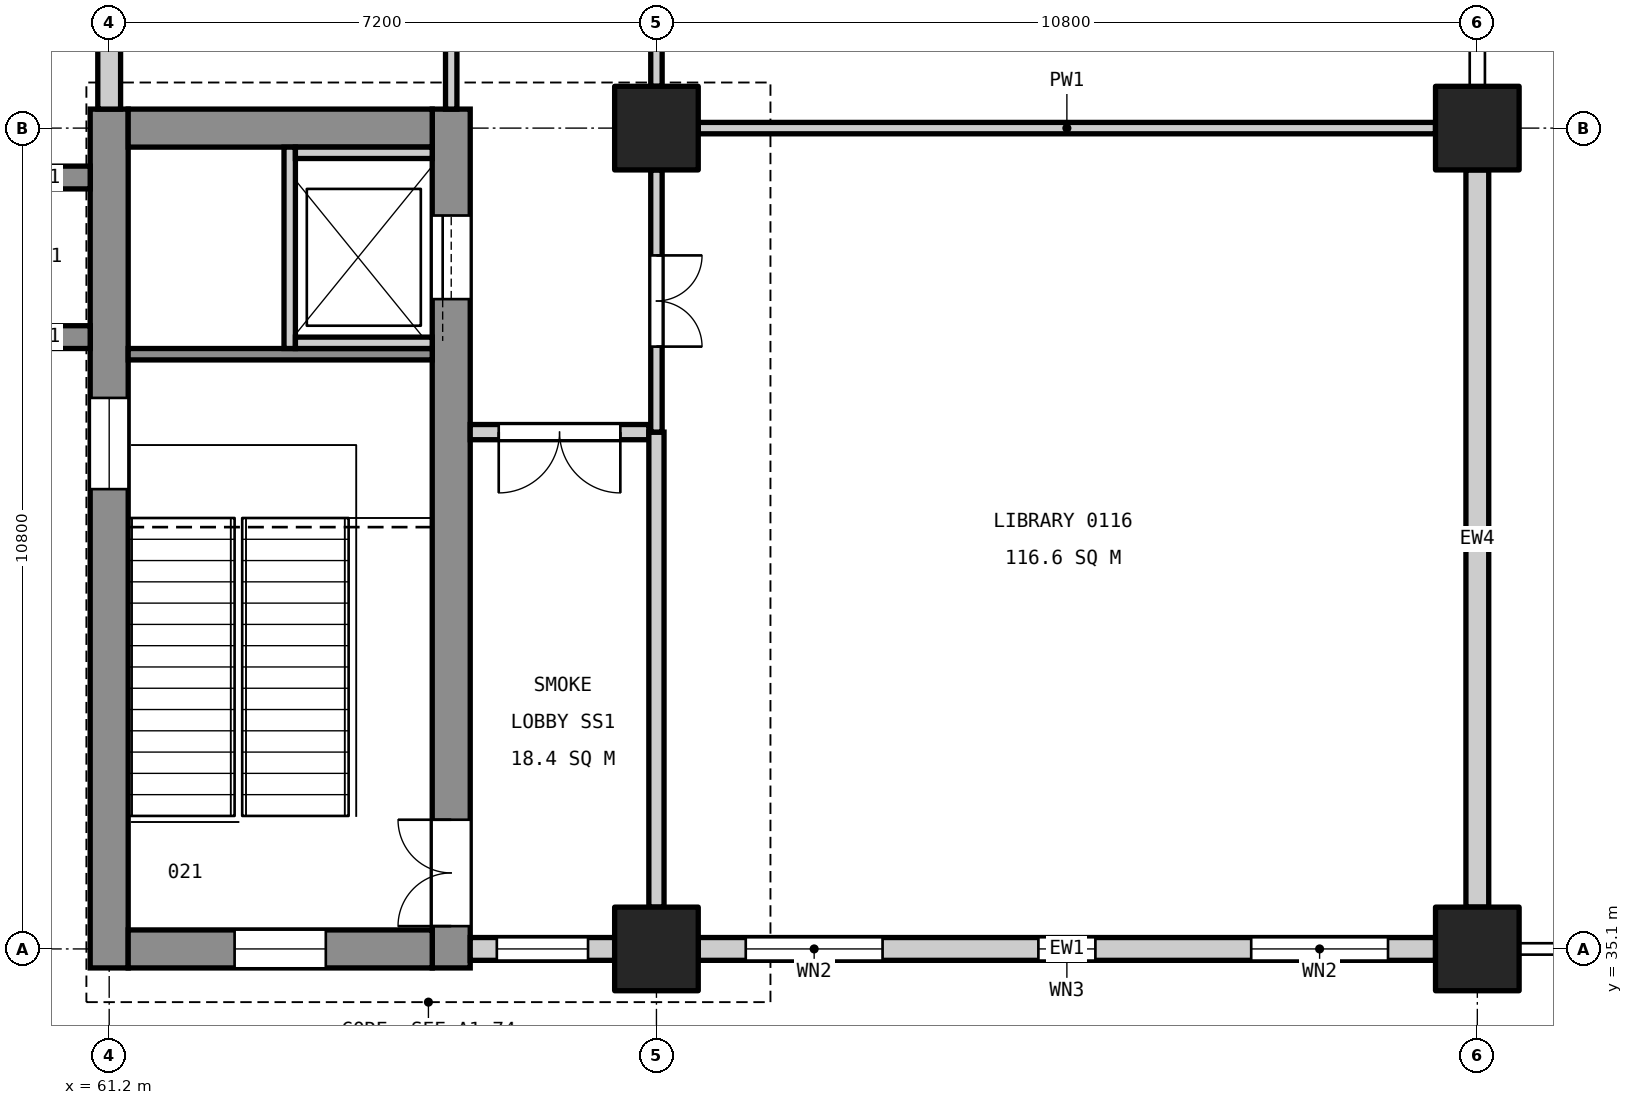
"""IFC4 building model, lengths in metres.
Left out: names, types, materials, properties, quantities, classifications, styles, units other than length and angle.
Written with IfcOpenShell. Run it as: python <this file> out.ifc"""

import sys

from ifc_helpers import new_model, si_unit, direction, frame, frame_2d, origin, origin_2d, place, context, subcontext, project, spatial, rectangle, extrude, element, fill, save


model = new_model("IFC4")
c1 = context("Model", 3, precision=1e-05, world=origin(), true_north=direction((0.0, 1.0)))
c2 = subcontext(c1, "Body", "Model", "MODEL_VIEW")
j1 = project(units=[si_unit("LENGTHUNIT", "METRE"), si_unit("PLANEANGLEUNIT", "RADIAN")], contexts=[c1])
p1 = place(None, origin())
s1 = spatial("IfcSite", under=j1, at=p1, CompositionType="ELEMENT")
p2 = place(p1, origin())
s2 = spatial("IfcBuilding", under=s1, at=p2, CompositionType="ELEMENT")
p3 = place(p2, frame((0.0, 0.0, 6.0)))
s3 = spatial("IfcBuildingStorey", under=s2, at=p3, CompositionType="ELEMENT", Elevation=6.0)
for number, where, z_axis, x_axis in (
    (1, (68.4, 35.1, 0.0), (0.0, 0.0, 1.0), (1.0, 0.0, 0.0)),
    (2, (68.4, 45.9, 0.0), (0.0, 0.0, 1.0), (1.0, 0.0, 0.0)),
    (3, (79.2, 35.1, 0.0), (0.0, 0.0, 1.0), (1.0, 0.0, 0.0)),
    (4, (79.2, 45.9, 0.0), (0.0, 0.0, 1.0), (1.0, 0.0, 0.0)),
):
    element("IfcColumn", number, at=place(p3, frame(where, z_axis=z_axis, x_axis=x_axis)), inside=s3, PredefinedType="COLUMN", context=c2, shape_type="SweptSolid", body=[
        extrude(rectangle(XDim=1.1, YDim=1.1, at=origin_2d()), origin(), (0.0, 0.0, 1.0), 5.4),
    ])
p4 = place(p3, frame((61.2, 34.85, 0.0), z_axis=(0.0, 0.0, 1.0), x_axis=(0.0, 1.0, 0.0)))
e5 = element("IfcWall", 5, at=p4, inside=s3, PredefinedType="SHEAR", context=c2, shape_type="SweptSolid", body=[
    extrude(rectangle(XDim=11.3, YDim=0.5, at=frame_2d((5.65, 0.0))), origin(), (0.0, 0.0, 1.0), 5.1),
])
p5 = place(p4, frame((6.3, 0.0, 3.4)))
e6 = element("IfcOpeningElement", 6, at=p5, cuts=e5, PredefinedType="OPENING", context=c2, shape_type="SweptSolid", body=[
    extrude(rectangle(XDim=1.2, YDim=0.9, at=frame_2d((0.6, 0.45))), frame((0.0, 0.26, 0.0), z_axis=(0.0, -1.0, 0.0), x_axis=(1.0, 0.0, 0.0)), (0.0, 0.0, 1.0), 0.52),
])
p6 = place(p3, frame((65.7, 34.85, 0.0), z_axis=(0.0, 0.0, 1.0), x_axis=(0.0, 1.0, 0.0)))
e7 = element("IfcWall", 7, at=p6, inside=s3, PredefinedType="SHEAR", context=c2, shape_type="SweptSolid", body=[
    extrude(rectangle(XDim=11.3, YDim=0.5, at=frame_2d((5.65, 0.0))), origin(), (0.0, 0.0, 1.0), 5.1),
])
p7 = place(p6, frame((0.55, 0.0, 0.0)))
e8 = element("IfcOpeningElement", 8, at=p7, cuts=e7, PredefinedType="OPENING", context=c2, shape_type="SweptSolid", body=[
    extrude(rectangle(XDim=1.4, YDim=2.1, at=frame_2d((0.7, 1.05))), frame((0.0, 0.26, 0.0), z_axis=(0.0, -1.0, 0.0), x_axis=(1.0, 0.0, 0.0)), (0.0, 0.0, 1.0), 0.52),
])
p8 = place(p6, frame((8.8, 0.0, 0.0)))
e9 = element("IfcOpeningElement", 9, at=p8, cuts=e7, PredefinedType="OPENING", context=c2, shape_type="SweptSolid", body=[
    extrude(rectangle(XDim=1.1, YDim=2.1, at=frame_2d((0.55, 1.05))), frame((0.0, 0.26, 0.0), z_axis=(0.0, -1.0, 0.0), x_axis=(1.0, 0.0, 0.0)), (0.0, 0.0, 1.0), 0.52),
])
p9 = place(p3, frame((61.45, 35.1, 0.0), z_axis=(0.0, 0.0, 1.0), x_axis=(1.0, 0.0, 0.0)))
e10 = element("IfcWall", 10, at=p9, inside=s3, PredefinedType="SHEAR", context=c2, shape_type="SweptSolid", body=[
    extrude(rectangle(XDim=4.0, YDim=0.5, at=frame_2d((2.0, 0.0))), origin(), (0.0, 0.0, 1.0), 5.1),
])
p10 = place(p9, frame((1.4, 0.0, 3.4)))
e11 = element("IfcOpeningElement", 11, at=p10, cuts=e10, PredefinedType="OPENING", context=c2, shape_type="SweptSolid", body=[
    extrude(rectangle(XDim=1.2, YDim=0.9, at=frame_2d((0.6, 0.45))), frame((0.0, 0.26, 0.0), z_axis=(0.0, -1.0, 0.0), x_axis=(1.0, 0.0, 0.0)), (0.0, 0.0, 1.0), 0.52),
])
p11 = place(p3, frame((61.45, 45.9, 0.0), z_axis=(0.0, 0.0, 1.0), x_axis=(1.0, 0.0, 0.0)))
e12 = element("IfcWall", 12, at=p11, inside=s3, PredefinedType="SHEAR", context=c2, shape_type="SweptSolid", body=[
    extrude(rectangle(XDim=4.0, YDim=0.5, at=frame_2d((2.0, 0.0))), origin(), (0.0, 0.0, 1.0), 5.1),
])
for number, where, z_axis, x_axis in (
    (13, (60.95, 43.15, 0.0), (0.0, 0.0, 1.0), (-1.0, 0.0, 0.0)),
    (14, (60.95, 45.25, 0.0), (0.0, 0.0, 1.0), (-1.0, 0.0, 0.0)),
):
    element("IfcWall", number, at=place(p3, frame(where, z_axis=z_axis, x_axis=x_axis)), inside=s3, PredefinedType="SHEAR", context=c2, shape_type="SweptSolid", body=[
        extrude(rectangle(XDim=1.25, YDim=0.3, at=frame_2d((0.625, 0.0))), origin(), (0.0, 0.0, 1.0), 5.4),
    ])
p12 = place(p3, frame((61.45, 42.925, 0.0), z_axis=(0.0, 0.0, 1.0), x_axis=(1.0, 0.0, 0.0)))
e15 = element("IfcWall", 15, at=p12, inside=s3, PredefinedType="SOLIDWALL", context=c2, shape_type="SweptSolid", body=[
    extrude(rectangle(XDim=4.0, YDim=0.15, at=frame_2d((2.0, 0.0))), origin(), (0.0, 0.0, 1.0), 5.1),
])
p13 = place(p3, frame((63.575, 43.0, 0.0), z_axis=(0.0, 0.0, 1.0), x_axis=(0.0, 1.0, 0.0)))
e16 = element("IfcWall", 16, at=p13, inside=s3, PredefinedType="SOLIDWALL", context=c2, shape_type="SweptSolid", body=[
    extrude(rectangle(XDim=2.65, YDim=0.15, at=frame_2d((1.325, 0.0))), origin(), (0.0, 0.0, 1.0), 5.4),
])
for number, where, z_axis, x_axis in (
    (17, (63.65, 43.075, 0.0), (0.0, 0.0, 1.0), (1.0, 0.0, 0.0)),
    (18, (63.65, 45.575, 0.0), (0.0, 0.0, 1.0), (1.0, 0.0, 0.0)),
):
    element("IfcWall", number, at=place(p3, frame(where, z_axis=z_axis, x_axis=x_axis)), inside=s3, PredefinedType="SOLIDWALL", context=c2, shape_type="SweptSolid", body=[
        extrude(rectangle(XDim=1.8, YDim=0.15, at=frame_2d((0.9, 0.0))), origin(), (0.0, 0.0, 1.0), 5.4),
    ])
p14 = place(p3, frame((61.2, 46.15, 0.0), z_axis=(0.0, 0.0, 1.0), x_axis=(0.0, 1.0, 0.0)))
e19 = element("IfcWall", 19, at=p14, inside=s3, PredefinedType="STANDARD", context=c2, shape_type="SweptSolid", body=[
    extrude(rectangle(XDim=10.0, YDim=0.3, at=frame_2d((5.0, 0.0))), origin(), (0.0, 0.0, 1.0), 4.1),
])
p15 = place(p14, frame((1.3, 0.0, 0.8)))
e20 = element("IfcOpeningElement", 20, at=p15, cuts=e19, PredefinedType="OPENING", context=c2, shape_type="SweptSolid", body=[
    extrude(rectangle(XDim=0.75, YDim=1.2, at=frame_2d((0.375, 0.6))), frame((0.0, 0.16, 0.0), z_axis=(0.0, -1.0, 0.0), x_axis=(1.0, 0.0, 0.0)), (0.0, 0.0, 1.0), 0.32),
])
p16 = place(p14, frame((4.25, 0.0, 0.9)))
e21 = element("IfcOpeningElement", 21, at=p16, cuts=e19, PredefinedType="OPENING", context=c2, shape_type="SweptSolid", body=[
    extrude(rectangle(XDim=1.8, YDim=3.0, at=frame_2d((0.9, 1.5))), frame((0.0, 0.16, 0.0), z_axis=(0.0, -1.0, 0.0), x_axis=(1.0, 0.0, 0.0)), (0.0, 0.0, 1.0), 0.32),
])
p17 = place(p14, frame((7.575, 0.0, 0.9)))
e22 = element("IfcOpeningElement", 22, at=p17, cuts=e19, PredefinedType="OPENING", context=c2, shape_type="SweptSolid", body=[
    extrude(rectangle(XDim=1.8, YDim=3.0, at=frame_2d((0.9, 1.5))), frame((0.0, 0.16, 0.0), z_axis=(0.0, -1.0, 0.0), x_axis=(1.0, 0.0, 0.0)), (0.0, 0.0, 1.0), 0.32),
])
p18 = place(p3, frame((65.95, 35.1, 0.0), z_axis=(0.0, 0.0, 1.0), x_axis=(1.0, 0.0, 0.0)))
e23 = element("IfcWall", 23, at=p18, inside=s3, PredefinedType="STANDARD", context=c2, shape_type="SweptSolid", body=[
    extrude(rectangle(XDim=1.9, YDim=0.3, at=frame_2d((0.95, 0.0))), origin(), (0.0, 0.0, 1.0), 4.3),
])
p19 = place(p18, frame((0.35, 0.0, 0.9)))
e24 = element("IfcOpeningElement", 24, at=p19, cuts=e23, PredefinedType="OPENING", context=c2, shape_type="SweptSolid", body=[
    extrude(rectangle(XDim=1.2, YDim=2.4, at=frame_2d((0.6, 1.2))), frame((0.0, 0.16, 0.0), z_axis=(0.0, -1.0, 0.0), x_axis=(1.0, 0.0, 0.0)), (0.0, 0.0, 1.0), 0.32),
])
p20 = place(p3, frame((68.95, 35.1, 0.0), z_axis=(0.0, 0.0, 1.0), x_axis=(1.0, 0.0, 0.0)))
e25 = element("IfcWall", 25, at=p20, inside=s3, PredefinedType="STANDARD", context=c2, shape_type="SweptSolid", body=[
    extrude(rectangle(XDim=9.7, YDim=0.3, at=frame_2d((4.85, 0.0))), origin(), (0.0, 0.0, 1.0), 4.3),
])
p21 = place(p20, frame((0.625, 0.0, 0.9)))
e26 = element("IfcOpeningElement", 26, at=p21, cuts=e25, PredefinedType="OPENING", context=c2, shape_type="SweptSolid", body=[
    extrude(rectangle(XDim=1.8, YDim=3.0, at=frame_2d((0.9, 1.5))), frame((0.0, 0.16, 0.0), z_axis=(0.0, -1.0, 0.0), x_axis=(1.0, 0.0, 0.0)), (0.0, 0.0, 1.0), 0.32),
])
p22 = place(p20, frame((4.475, 0.0, 0.8)))
e27 = element("IfcOpeningElement", 27, at=p22, cuts=e25, PredefinedType="OPENING", context=c2, shape_type="SweptSolid", body=[
    extrude(rectangle(XDim=0.75, YDim=1.2, at=frame_2d((0.375, 0.6))), frame((0.0, 0.16, 0.0), z_axis=(0.0, -1.0, 0.0), x_axis=(1.0, 0.0, 0.0)), (0.0, 0.0, 1.0), 0.32),
])
p23 = place(p20, frame((7.275, 0.0, 0.9)))
e28 = element("IfcOpeningElement", 28, at=p23, cuts=e25, PredefinedType="OPENING", context=c2, shape_type="SweptSolid", body=[
    extrude(rectangle(XDim=1.8, YDim=3.0, at=frame_2d((0.9, 1.5))), frame((0.0, 0.16, 0.0), z_axis=(0.0, -1.0, 0.0), x_axis=(1.0, 0.0, 0.0)), (0.0, 0.0, 1.0), 0.32),
])
p24 = place(p3, frame((79.2, 35.65, 0.0), z_axis=(0.0, 0.0, 1.0), x_axis=(0.0, 1.0, 0.0)))
e29 = element("IfcWall", 29, at=p24, inside=s3, PredefinedType="STANDARD", context=c2, shape_type="SweptSolid", body=[
    extrude(rectangle(XDim=9.7, YDim=0.3, at=frame_2d((4.85, 0.0))), origin(), (0.0, 0.0, 1.0), 4.0),
])
p25 = place(p3, frame((65.7, 46.15, 0.0), z_axis=(0.0, 0.0, 1.0), x_axis=(0.0, 1.0, 0.0)))
e30 = element("IfcWall", 30, at=p25, inside=s3, PredefinedType="PARTITIONING", context=c2, shape_type="SweptSolid", body=[
    extrude(rectangle(XDim=10.4, YDim=0.15, at=frame_2d((5.2, 0.0))), origin(), (0.0, 0.0, 1.0), 4.0),
])
p26 = place(p25, frame((4.65, 0.0, 0.0)))
e31 = element("IfcOpeningElement", 31, at=p26, cuts=e30, PredefinedType="OPENING", context=c2, shape_type="SweptSolid", body=[
    extrude(rectangle(XDim=1.0, YDim=2.1, at=frame_2d((0.5, 1.05))), frame((0.0, 0.085, 0.0), z_axis=(0.0, -1.0, 0.0), x_axis=(1.0, 0.0, 0.0)), (0.0, 0.0, 1.0), 0.17),
])
p27 = place(p25, frame((1.05, 0.0, 0.0)))
e32 = element("IfcOpeningElement", 32, at=p27, cuts=e30, PredefinedType="OPENING", context=c2, shape_type="SweptSolid", body=[
    extrude(rectangle(XDim=1.0, YDim=2.1, at=frame_2d((0.5, 1.05))), frame((0.0, 0.085, 0.0), z_axis=(0.0, -1.0, 0.0), x_axis=(1.0, 0.0, 0.0)), (0.0, 0.0, 1.0), 0.17),
])
p28 = place(p25, frame((8.25, 0.0, 0.0)))
e33 = element("IfcOpeningElement", 33, at=p28, cuts=e30, PredefinedType="OPENING", context=c2, shape_type="SweptSolid", body=[
    extrude(rectangle(XDim=1.0, YDim=2.1, at=frame_2d((0.5, 1.05))), frame((0.0, 0.085, 0.0), z_axis=(0.0, -1.0, 0.0), x_axis=(1.0, 0.0, 0.0)), (0.0, 0.0, 1.0), 0.17),
])
p29 = place(p3, frame((65.95, 41.9, 0.0), z_axis=(0.0, 0.0, 1.0), x_axis=(1.0, 0.0, 0.0)))
e34 = element("IfcWall", 34, at=p29, inside=s3, PredefinedType="PARTITIONING", context=c2, shape_type="SweptSolid", body=[
    extrude(rectangle(XDim=2.35, YDim=0.2, at=frame_2d((1.175, 0.0))), origin(), (0.0, 0.0, 1.0), 4.0),
])
p30 = place(p29, frame((0.375, 0.0, 0.0)))
e35 = element("IfcOpeningElement", 35, at=p30, cuts=e34, PredefinedType="OPENING", context=c2, shape_type="SweptSolid", body=[
    extrude(rectangle(XDim=1.6, YDim=2.1, at=frame_2d((0.8, 1.05))), frame((0.0, 0.11, 0.0), z_axis=(0.0, -1.0, 0.0), x_axis=(1.0, 0.0, 0.0)), (0.0, 0.0, 1.0), 0.22),
])
p31 = place(p3, frame((68.4, 35.65, 0.0), z_axis=(0.0, 0.0, 1.0), x_axis=(0.0, 1.0, 0.0)))
e36 = element("IfcWall", 36, at=p31, inside=s3, PredefinedType="PARTITIONING", context=c2, shape_type="SweptSolid", body=[
    extrude(rectangle(XDim=6.25, YDim=0.2, at=frame_2d((3.125, 0.0))), origin(), (0.0, 0.0, 1.0), 4.0),
])
p32 = place(p3, frame((68.4, 41.9, 0.0), z_axis=(0.0, 0.0, 1.0), x_axis=(0.0, 1.0, 0.0)))
e37 = element("IfcWall", 37, at=p32, inside=s3, PredefinedType="PARTITIONING", context=c2, shape_type="SweptSolid", body=[
    extrude(rectangle(XDim=3.45, YDim=0.15, at=frame_2d((1.725, 0.0))), origin(), (0.0, 0.0, 1.0), 4.0),
])
p33 = place(p32, frame((1.125, 0.0, 0.0)))
e38 = element("IfcOpeningElement", 38, at=p33, cuts=e37, PredefinedType="OPENING", context=c2, shape_type="SweptSolid", body=[
    extrude(rectangle(XDim=1.2, YDim=2.1, at=frame_2d((0.6, 1.05))), frame((0.0, 0.085, 0.0), z_axis=(0.0, -1.0, 0.0), x_axis=(1.0, 0.0, 0.0)), (0.0, 0.0, 1.0), 0.17),
])
p34 = place(p3, frame((68.4, 46.45, 0.0), z_axis=(0.0, 0.0, 1.0), x_axis=(0.0, 1.0, 0.0)))
e39 = element("IfcWall", 39, at=p34, inside=s3, PredefinedType="PARTITIONING", context=c2, shape_type="SweptSolid", body=[
    extrude(rectangle(XDim=9.7, YDim=0.15, at=frame_2d((4.85, 0.0))), origin(), (0.0, 0.0, 1.0), 4.0),
])
p35 = place(p34, frame((4.25, 0.0, 0.0)))
e40 = element("IfcOpeningElement", 40, at=p35, cuts=e39, PredefinedType="OPENING", context=c2, shape_type="SweptSolid", body=[
    extrude(rectangle(XDim=1.2, YDim=2.1, at=frame_2d((0.6, 1.05))), frame((0.0, 0.085, 0.0), z_axis=(0.0, -1.0, 0.0), x_axis=(1.0, 0.0, 0.0)), (0.0, 0.0, 1.0), 0.17),
])
p36 = place(p3, frame((68.95, 45.9, 0.0), z_axis=(0.0, 0.0, 1.0), x_axis=(1.0, 0.0, 0.0)))
e41 = element("IfcWall", 41, at=p36, inside=s3, PredefinedType="PARTITIONING", context=c2, shape_type="SweptSolid", body=[
    extrude(rectangle(XDim=9.7, YDim=0.15, at=frame_2d((4.85, 0.0))), origin(), (0.0, 0.0, 1.0), 4.3),
])
p37 = place(p7, origin())
e42 = element("IfcDoor", 42, at=p37, inside=s3, OperationType="DOUBLE_DOOR_SINGLE_SWING", PredefinedType="DOOR", context=c2, shape_type="SweptSolid", body=[
    extrude(rectangle(XDim=1.4, YDim=2.1, at=frame_2d((0.7, 1.05))), frame((0.0, 0.025, 0.0), z_axis=(0.0, -1.0, 0.0), x_axis=(1.0, 0.0, 0.0)), (0.0, 0.0, 1.0), 0.05),
])
fill(e8, e42)
p38 = place(p8, origin())
e43 = element("IfcDoor", 43, at=p38, inside=s3, OperationType="SLIDING_TO_LEFT", PredefinedType="DOOR", context=c2, shape_type="SweptSolid", body=[
    extrude(rectangle(XDim=1.1, YDim=2.1, at=frame_2d((0.55, 1.05))), frame((0.0, 0.025, 0.0), z_axis=(0.0, -1.0, 0.0), x_axis=(1.0, 0.0, 0.0)), (0.0, 0.0, 1.0), 0.05),
])
fill(e9, e43)
p39 = place(p19, origin())
e44 = element("IfcWindow", 44, at=p39, inside=s3, PartitioningType="SINGLE_PANEL", PredefinedType="WINDOW", context=c2, shape_type="SweptSolid", body=[
    extrude(rectangle(XDim=1.2, YDim=2.4, at=frame_2d((0.6, 1.2))), frame((0.0, 0.03, 0.0), z_axis=(0.0, -1.0, 0.0), x_axis=(1.0, 0.0, 0.0)), (0.0, 0.0, 1.0), 0.06),
])
fill(e24, e44)
p40 = place(p21, origin())
e45 = element("IfcWindow", 45, at=p40, inside=s3, PartitioningType="SINGLE_PANEL", PredefinedType="WINDOW", context=c2, shape_type="SweptSolid", body=[
    extrude(rectangle(XDim=1.8, YDim=3.0, at=frame_2d((0.9, 1.5))), frame((0.0, 0.03, 0.0), z_axis=(0.0, -1.0, 0.0), x_axis=(1.0, 0.0, 0.0)), (0.0, 0.0, 1.0), 0.06),
])
fill(e26, e45)
p41 = place(p22, origin())
e46 = element("IfcWindow", 46, at=p41, inside=s3, PartitioningType="SINGLE_PANEL", PredefinedType="WINDOW", context=c2, shape_type="SweptSolid", body=[
    extrude(rectangle(XDim=0.75, YDim=1.2, at=frame_2d((0.375, 0.6))), frame((0.0, 0.03, 0.0), z_axis=(0.0, -1.0, 0.0), x_axis=(1.0, 0.0, 0.0)), (0.0, 0.0, 1.0), 0.06),
])
fill(e27, e46)
p42 = place(p23, origin())
e47 = element("IfcWindow", 47, at=p42, inside=s3, PartitioningType="SINGLE_PANEL", PredefinedType="WINDOW", context=c2, shape_type="SweptSolid", body=[
    extrude(rectangle(XDim=1.8, YDim=3.0, at=frame_2d((0.9, 1.5))), frame((0.0, 0.03, 0.0), z_axis=(0.0, -1.0, 0.0), x_axis=(1.0, 0.0, 0.0)), (0.0, 0.0, 1.0), 0.06),
])
fill(e28, e47)
p43 = place(p5, origin())
e48 = element("IfcWindow", 48, at=p43, inside=s3, PartitioningType="SINGLE_PANEL", PredefinedType="WINDOW", context=c2, shape_type="SweptSolid", body=[
    extrude(rectangle(XDim=1.2, YDim=0.9, at=frame_2d((0.6, 0.45))), frame((0.0, 0.03, 0.0), z_axis=(0.0, -1.0, 0.0), x_axis=(1.0, 0.0, 0.0)), (0.0, 0.0, 1.0), 0.06),
])
fill(e6, e48)
p44 = place(p10, origin())
e49 = element("IfcWindow", 49, at=p44, inside=s3, PartitioningType="SINGLE_PANEL", PredefinedType="WINDOW", context=c2, shape_type="SweptSolid", body=[
    extrude(rectangle(XDim=1.2, YDim=0.9, at=frame_2d((0.6, 0.45))), frame((0.0, 0.03, 0.0), z_axis=(0.0, -1.0, 0.0), x_axis=(1.0, 0.0, 0.0)), (0.0, 0.0, 1.0), 0.06),
])
fill(e11, e49)
p45 = place(p33, frame((1.2, 0.0, 0.0), z_axis=(0.0, 0.0, 1.0), x_axis=(-1.0, 0.0, 0.0)))
e50 = element("IfcDoor", 50, at=p45, inside=s3, OperationType="DOUBLE_DOOR_SINGLE_SWING", PredefinedType="DOOR", context=c2, shape_type="SweptSolid", body=[
    extrude(rectangle(XDim=1.2, YDim=2.1, at=frame_2d((0.6, 1.05))), frame((0.0, 0.025, 0.0), z_axis=(0.0, -1.0, 0.0), x_axis=(1.0, 0.0, 0.0)), (0.0, 0.0, 1.0), 0.05),
])
fill(e38, e50)
p46 = place(p30, frame((1.6, 0.0, 0.0), z_axis=(0.0, 0.0, 1.0), x_axis=(-1.0, 0.0, 0.0)))
e51 = element("IfcDoor", 51, at=p46, inside=s3, OperationType="DOUBLE_DOOR_SINGLE_SWING", PredefinedType="DOOR", context=c2, shape_type="SweptSolid", body=[
    extrude(rectangle(XDim=1.6, YDim=2.1, at=frame_2d((0.8, 1.05))), frame((0.0, 0.025, 0.0), z_axis=(0.0, -1.0, 0.0), x_axis=(1.0, 0.0, 0.0)), (0.0, 0.0, 1.0), 0.05),
])
fill(e35, e51)
save(model, sys.argv[1])
